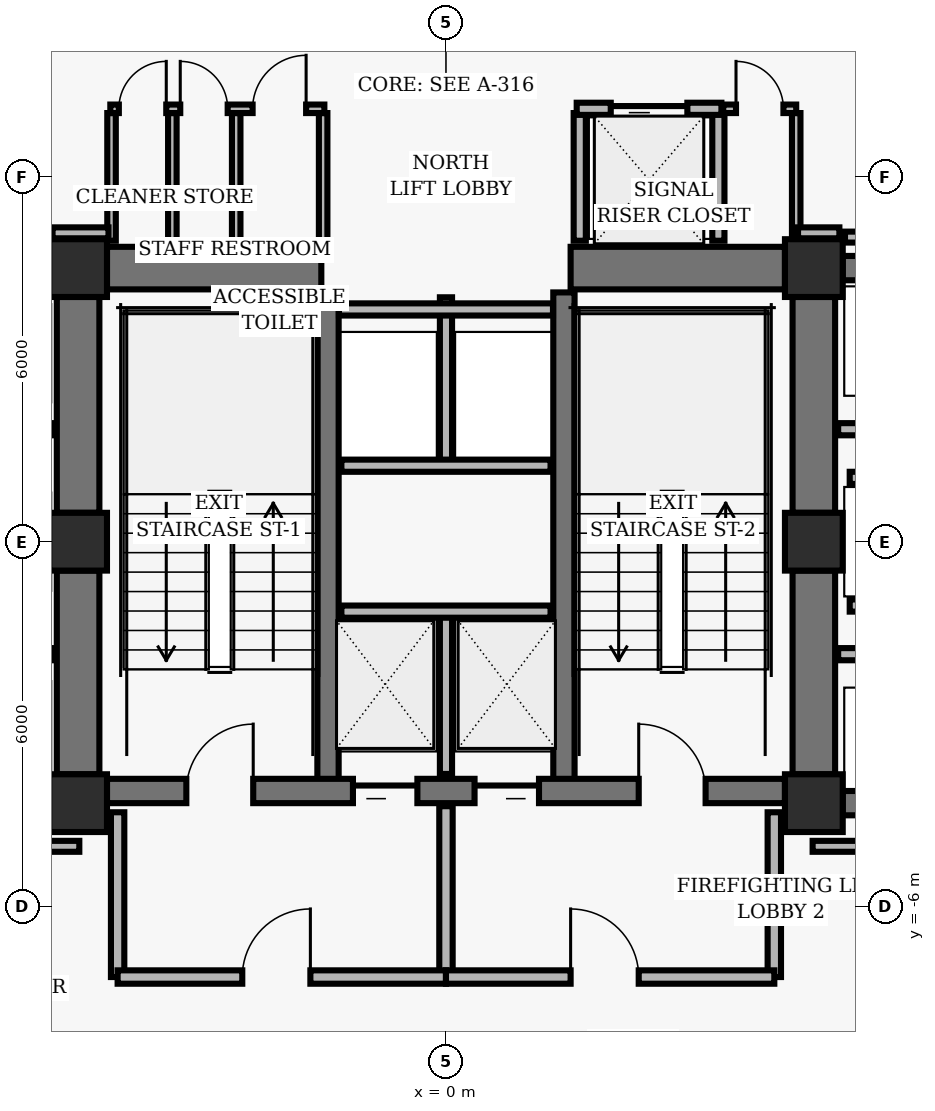
"""IFC4 building model, lengths in metres.
Left out: names, types, materials, properties, quantities, classifications, styles, units other than length and angle.
Written with IfcOpenShell. Run it as: python <this file> out.ifc"""

import sys

from ifc_helpers import new_model, si_unit, direction, frame, frame_2d, origin, origin_2d, place, context, subcontext, project, spatial, rectangle, hollow_rectangle, extrude, element, fill, save


model = new_model("IFC4")
c1 = context("Model", 3, precision=1e-05, world=origin(), true_north=direction((0.0, 1.0)))
c2 = subcontext(c1, "Body", "Model", "MODEL_VIEW")
j1 = project(units=[si_unit("LENGTHUNIT", "METRE"), si_unit("PLANEANGLEUNIT", "RADIAN")], contexts=[c1])
p1 = place(None, origin())
s1 = spatial("IfcSite", under=j1, at=p1, CompositionType="ELEMENT")
p2 = place(p1, origin())
s2 = spatial("IfcBuilding", under=s1, at=p2, CompositionType="ELEMENT")
p3 = place(p2, frame((0.0, 0.0, 49.6)))
s3 = spatial("IfcBuildingStorey", under=s2, at=p3, CompositionType="ELEMENT", Elevation=49.6)
for number, where, z_axis, x_axis in (
    (1, (-6.05, 4.5, 0.0), (0.0, 0.0, 1.0), (1.0, 0.0, 0.0)),
    (2, (6.05, 4.5, 0.0), (0.0, 0.0, 1.0), (1.0, 0.0, 0.0)),
    (3, (-6.05, 0.0, 0.0), (0.0, 0.0, 1.0), (1.0, 0.0, 0.0)),
    (4, (6.05, 0.0, 0.0), (0.0, 0.0, 1.0), (1.0, 0.0, 0.0)),
    (5, (-6.05, -4.3, 0.0), (0.0, 0.0, 1.0), (1.0, 0.0, 0.0)),
    (6, (6.05, -4.3, 0.0), (0.0, 0.0, 1.0), (1.0, 0.0, 0.0)),
):
    element("IfcColumn", number, at=place(p3, frame(where, z_axis=z_axis, x_axis=x_axis)), inside=s3, PredefinedType="COLUMN", context=c2, shape_type="SweptSolid", body=[
        extrude(hollow_rectangle(XDim=0.95, YDim=0.95, WallThickness=0.06, InnerFilletRadius=0.02, OuterFilletRadius=0.04, at=origin_2d()), origin(), (0.0, 0.0, 1.0), 3.36),
    ])
p4 = place(p3, frame((-6.05, 0.475, 0.0), z_axis=(0.0, 0.0, 1.0), x_axis=(0.0, 1.0, 0.0)))
e7 = element("IfcWall", 7, at=p4, inside=s3, PredefinedType="SHEAR", context=c2, shape_type="SweptSolid", body=[
    extrude(rectangle(XDim=3.55, YDim=0.7, at=frame_2d((1.775, 0.0))), origin(), (0.0, 0.0, 1.0), 3.098),
])
p5 = place(p3, frame((-6.05, -3.825, 0.0), z_axis=(0.0, 0.0, 1.0), x_axis=(0.0, 1.0, 0.0)))
e8 = element("IfcWall", 8, at=p5, inside=s3, PredefinedType="SHEAR", context=c2, shape_type="SweptSolid", body=[
    extrude(rectangle(XDim=3.35, YDim=0.7, at=frame_2d((1.675, 0.0))), origin(), (0.0, 0.0, 1.0), 3.098),
])
p6 = place(p3, frame((6.05, 0.475, 0.0), z_axis=(0.0, 0.0, 1.0), x_axis=(0.0, 1.0, 0.0)))
e9 = element("IfcWall", 9, at=p6, inside=s3, PredefinedType="SHEAR", context=c2, shape_type="SweptSolid", body=[
    extrude(rectangle(XDim=3.55, YDim=0.7, at=frame_2d((1.775, 0.0))), origin(), (0.0, 0.0, 1.0), 3.098),
])
p7 = place(p3, frame((6.05, -3.825, 0.0), z_axis=(0.0, 0.0, 1.0), x_axis=(0.0, 1.0, 0.0)))
e10 = element("IfcWall", 10, at=p7, inside=s3, PredefinedType="SHEAR", context=c2, shape_type="SweptSolid", body=[
    extrude(rectangle(XDim=3.35, YDim=0.7, at=frame_2d((1.675, 0.0))), origin(), (0.0, 0.0, 1.0), 3.098),
])
for number, where, z_axis, x_axis in (
    (11, (-1.94, -4.1, 0.0), (0.0, 0.0, 1.0), (0.0, 1.0, 0.0)),
    (12, (1.94, -4.1, 0.0), (0.0, 0.0, 1.0), (0.0, 1.0, 0.0)),
):
    element("IfcWall", number, at=place(p3, frame(where, z_axis=z_axis, x_axis=x_axis)), inside=s3, PredefinedType="SHEAR", context=c2, shape_type="SweptSolid", body=[
        extrude(rectangle(XDim=8.2, YDim=0.35, at=frame_2d((4.1, 0.0))), origin(), (0.0, 0.0, 1.0), 3.098),
    ])
p8 = place(p3, frame((-5.575, -4.1, 0.0), z_axis=(0.0, 0.0, 1.0), x_axis=(1.0, 0.0, 0.0)))
e13 = element("IfcWall", 13, at=p8, inside=s3, PredefinedType="SHEAR", context=c2, shape_type="SweptSolid", body=[
    extrude(rectangle(XDim=11.15, YDim=0.4, at=frame_2d((5.575, 0.0))), origin(), (0.0, 0.0, 1.0), 3.098),
])
p9 = place(p8, frame((1.305, 0.0, 0.0)))
e14 = element("IfcOpeningElement", 14, at=p9, cuts=e13, PredefinedType="OPENING", context=c2, shape_type="SweptSolid", body=[
    extrude(rectangle(XDim=1.1, YDim=2.04, at=frame_2d((0.55, 1.02))), frame((0.0, 0.21, 0.0), z_axis=(0.0, -1.0, 0.0), x_axis=(1.0, 0.0, 0.0)), (0.0, 0.0, 1.0), 0.42),
])
p10 = place(p8, frame((8.745, 0.0, 0.0)))
e15 = element("IfcOpeningElement", 15, at=p10, cuts=e13, PredefinedType="OPENING", context=c2, shape_type="SweptSolid", body=[
    extrude(rectangle(XDim=1.1, YDim=2.04, at=frame_2d((0.55, 1.02))), frame((0.0, 0.21, 0.0), z_axis=(0.0, -1.0, 0.0), x_axis=(1.0, 0.0, 0.0)), (0.0, 0.0, 1.0), 0.42),
])
p11 = place(p8, frame((4.045, 0.0, 0.0)))
e16 = element("IfcOpeningElement", 16, at=p11, cuts=e13, PredefinedType="OPENING", context=c2, shape_type="SweptSolid", body=[
    extrude(rectangle(XDim=1.06, YDim=2.04, at=frame_2d((0.53, 1.02))), frame((0.0, 0.21, 0.0), z_axis=(0.0, -1.0, 0.0), x_axis=(1.0, 0.0, 0.0)), (0.0, 0.0, 1.0), 0.42),
])
p12 = place(p8, frame((6.045, 0.0, 0.0)))
e17 = element("IfcOpeningElement", 17, at=p12, cuts=e13, PredefinedType="OPENING", context=c2, shape_type="SweptSolid", body=[
    extrude(rectangle(XDim=1.06, YDim=2.04, at=frame_2d((0.53, 1.02))), frame((0.0, 0.21, 0.0), z_axis=(0.0, -1.0, 0.0), x_axis=(1.0, 0.0, 0.0)), (0.0, 0.0, 1.0), 0.42),
])
for number, where, z_axis, x_axis in (
    (18, (-5.575, 4.5, 0.0), (0.0, 0.0, 1.0), (1.0, 0.0, 0.0)),
    (19, (2.05, 4.5, 0.0), (0.0, 0.0, 1.0), (1.0, 0.0, 0.0)),
):
    element("IfcWall", number, at=place(p3, frame(where, z_axis=z_axis, x_axis=x_axis)), inside=s3, PredefinedType="SHEAR", context=c2, shape_type="SweptSolid", body=[
        extrude(rectangle(XDim=3.525, YDim=0.7, at=frame_2d((1.762, 0.0))), origin(), (0.0, 0.0, 1.0), 3.098),
    ])
for number, where, z_axis, x_axis in (
    (20, (6.525, 4.5, 0.0), (0.0, 0.0, 1.0), (1.0, 0.0, 0.0)),
    (21, (6.525, -4.3, 0.0), (0.0, 0.0, 1.0), (1.0, 0.0, 0.0)),
):
    element("IfcWall", number, at=place(p3, frame(where, z_axis=z_axis, x_axis=x_axis)), inside=s3, PredefinedType="SHEAR", context=c2, shape_type="SweptSolid", body=[
        extrude(rectangle(XDim=1.95, YDim=0.4, at=frame_2d((0.975, 0.0))), origin(), (0.0, 0.0, 1.0), 3.098),
    ])
p13 = place(p3, frame((0.0, -3.82, 0.0), z_axis=(0.0, 0.0, 1.0), x_axis=(0.0, 1.0, 0.0)))
e22 = element("IfcWall", 22, at=p13, inside=s3, PredefinedType="PARTITIONING", context=c2, shape_type="SweptSolid", body=[
    extrude(rectangle(XDim=2.67, YDim=0.2, at=frame_2d((1.335, 0.0))), origin(), (0.0, 0.0, 1.0), 3.073),
])
p14 = place(p3, frame((-1.72, -1.15, 0.0), z_axis=(0.0, 0.0, 1.0), x_axis=(1.0, 0.0, 0.0)))
e23 = element("IfcWall", 23, at=p14, inside=s3, PredefinedType="PARTITIONING", context=c2, shape_type="SweptSolid", body=[
    extrude(rectangle(XDim=3.44, YDim=0.2, at=frame_2d((1.72, 0.0))), origin(), (0.0, 0.0, 1.0), 3.073),
])
for number, where, z_axis, x_axis in (
    (24, (-5.4, -7.16, 0.0), (0.0, 0.0, 1.0), (0.0, 1.0, 0.0)),
    (25, (5.4, -7.16, 0.0), (0.0, 0.0, 1.0), (0.0, 1.0, 0.0)),
):
    element("IfcWall", number, at=place(p3, frame(where, z_axis=z_axis, x_axis=x_axis)), inside=s3, PredefinedType="PARTITIONING", context=c2, shape_type="SweptSolid", body=[
        extrude(rectangle(XDim=2.71, YDim=0.22, at=frame_2d((1.355, 0.0))), origin(), (0.0, 0.0, 1.0), 3.073),
    ])
p15 = place(p3, frame((0.0, -7.16, 0.0), z_axis=(0.0, 0.0, 1.0), x_axis=(0.0, 1.0, 0.0)))
e26 = element("IfcWall", 26, at=p15, inside=s3, PredefinedType="PARTITIONING", context=c2, shape_type="SweptSolid", body=[
    extrude(rectangle(XDim=2.81, YDim=0.22, at=frame_2d((1.405, 0.0))), origin(), (0.0, 0.0, 1.0), 3.073),
])
p16 = place(p3, frame((-5.4, -7.16, 0.0), z_axis=(0.0, 0.0, 1.0), x_axis=(1.0, 0.0, 0.0)))
e27 = element("IfcWall", 27, at=p16, inside=s3, PredefinedType="PARTITIONING", context=c2, shape_type="SweptSolid", body=[
    extrude(rectangle(XDim=5.4, YDim=0.22, at=frame_2d((2.7, 0.0))), origin(), (0.0, 0.0, 1.0), 2.587),
])
p17 = place(p16, frame((2.05, 0.0, 0.0)))
e28 = element("IfcOpeningElement", 28, at=p17, cuts=e27, PredefinedType="OPENING", context=c2, shape_type="SweptSolid", body=[
    extrude(rectangle(XDim=1.12, YDim=2.02, at=frame_2d((0.56, 1.01))), frame((0.0, 0.12, 0.0), z_axis=(0.0, -1.0, 0.0), x_axis=(1.0, 0.0, 0.0)), (0.0, 0.0, 1.0), 0.24),
])
p18 = place(p3, frame((0.0, -7.16, 0.0), z_axis=(0.0, 0.0, 1.0), x_axis=(1.0, 0.0, 0.0)))
e29 = element("IfcWall", 29, at=p18, inside=s3, PredefinedType="PARTITIONING", context=c2, shape_type="SweptSolid", body=[
    extrude(rectangle(XDim=5.4, YDim=0.22, at=frame_2d((2.7, 0.0))), origin(), (0.0, 0.0, 1.0), 2.587),
])
p19 = place(p18, frame((2.05, 0.0, 0.0)))
e30 = element("IfcOpeningElement", 30, at=p19, cuts=e29, PredefinedType="OPENING", context=c2, shape_type="SweptSolid", body=[
    extrude(rectangle(XDim=1.12, YDim=2.02, at=frame_2d((0.56, 1.01))), frame((0.0, 0.12, 0.0), z_axis=(0.0, -1.0, 0.0), x_axis=(1.0, 0.0, 0.0)), (0.0, 0.0, 1.0), 0.24),
])
p20 = place(p3, frame((0.0, 1.25, 0.0), z_axis=(0.0, 0.0, 1.0), x_axis=(0.0, 1.0, 0.0)))
e31 = element("IfcWall", 31, at=p20, inside=s3, PredefinedType="PARTITIONING", context=c2, shape_type="SweptSolid", body=[
    extrude(rectangle(XDim=2.77, YDim=0.2, at=frame_2d((1.385, 0.0))), origin(), (0.0, 0.0, 1.0), 3.073),
])
p21 = place(p3, frame((-1.72, 1.25, 0.0), z_axis=(0.0, 0.0, 1.0), x_axis=(1.0, 0.0, 0.0)))
e32 = element("IfcWall", 32, at=p21, inside=s3, PredefinedType="PARTITIONING", context=c2, shape_type="SweptSolid", body=[
    extrude(rectangle(XDim=3.44, YDim=0.2, at=frame_2d((1.72, 0.0))), origin(), (0.0, 0.0, 1.0), 3.073),
])
p22 = place(p3, frame((-1.76, 3.82, 0.0), z_axis=(0.0, 0.0, 1.0), x_axis=(1.0, 0.0, 0.0)))
e33 = element("IfcWall", 33, at=p22, inside=s3, PredefinedType="PARTITIONING", context=c2, shape_type="SweptSolid", body=[
    extrude(rectangle(XDim=3.52, YDim=0.2, at=frame_2d((1.76, 0.0))), origin(), (0.0, 0.0, 1.0), 3.073),
])
for number, where, z_axis, x_axis in (
    (34, (2.2, 4.95, 0.0), (0.0, 0.0, 1.0), (0.0, 1.0, 0.0)),
    (35, (4.48, 4.95, 0.0), (0.0, 0.0, 1.0), (0.0, 1.0, 0.0)),
):
    element("IfcWall", number, at=place(p3, frame(where, z_axis=z_axis, x_axis=x_axis)), inside=s3, PredefinedType="PARTITIONING", context=c2, shape_type="SweptSolid", body=[
        extrude(rectangle(XDim=2.1, YDim=0.2, at=frame_2d((1.05, 0.0))), origin(), (0.0, 0.0, 1.0), 3.073),
    ])
p23 = place(p3, frame((2.15, 7.12, 0.0), z_axis=(0.0, 0.0, 1.0), x_axis=(1.0, 0.0, 0.0)))
e36 = element("IfcWall", 36, at=p23, inside=s3, PredefinedType="PARTITIONING", context=c2, shape_type="SweptSolid", body=[
    extrude(rectangle(XDim=2.38, YDim=0.2, at=frame_2d((1.19, 0.0))), origin(), (0.0, 0.0, 1.0), 2.587),
])
p24 = place(p23, frame((0.56, 0.0, 0.0)))
e37 = element("IfcOpeningElement", 37, at=p24, cuts=e36, PredefinedType="OPENING", context=c2, shape_type="SweptSolid", body=[
    extrude(rectangle(XDim=1.26, YDim=2.06, at=frame_2d((0.63, 1.03))), frame((0.0, 0.11, 0.0), z_axis=(0.0, -1.0, 0.0), x_axis=(1.0, 0.0, 0.0)), (0.0, 0.0, 1.0), 0.22),
])
for number, where, z_axis, x_axis in (
    (38, (-5.5, 4.95, 0.0), (0.0, 0.0, 1.0), (0.0, 1.0, 0.0)),
    (39, (-4.5, 4.95, 0.0), (0.0, 0.0, 1.0), (0.0, 1.0, 0.0)),
    (40, (-3.45, 4.95, 0.0), (0.0, 0.0, 1.0), (0.0, 1.0, 0.0)),
    (41, (-2.02, 4.95, 0.0), (0.0, 0.0, 1.0), (0.0, 1.0, 0.0)),
):
    element("IfcWall", number, at=place(p3, frame(where, z_axis=z_axis, x_axis=x_axis)), inside=s3, PredefinedType="PARTITIONING", context=c2, shape_type="SweptSolid", body=[
        extrude(rectangle(XDim=2.1, YDim=0.14, at=frame_2d((1.05, 0.0))), origin(), (0.0, 0.0, 1.0), 3.073),
    ])
p25 = place(p3, frame((-5.52, 7.12, 0.0), z_axis=(0.0, 0.0, 1.0), x_axis=(1.0, 0.0, 0.0)))
e42 = element("IfcWall", 42, at=p25, inside=s3, PredefinedType="PARTITIONING", context=c2, shape_type="SweptSolid", body=[
    extrude(rectangle(XDim=3.52, YDim=0.14, at=frame_2d((1.76, 0.0))), origin(), (0.0, 0.0, 1.0), 3.073),
])
p26 = place(p25, frame((0.14, 0.0, 0.0)))
e43 = element("IfcOpeningElement", 43, at=p26, cuts=e42, PredefinedType="OPENING", context=c2, shape_type="SweptSolid", body=[
    extrude(rectangle(XDim=0.78, YDim=2.01, at=frame_2d((0.39, 1.005))), frame((0.0, 0.08, 0.0), z_axis=(0.0, -1.0, 0.0), x_axis=(1.0, 0.0, 0.0)), (0.0, 0.0, 1.0), 0.16),
])
p27 = place(p25, frame((1.15, 0.0, 0.0)))
e44 = element("IfcOpeningElement", 44, at=p27, cuts=e42, PredefinedType="OPENING", context=c2, shape_type="SweptSolid", body=[
    extrude(rectangle(XDim=0.78, YDim=2.01, at=frame_2d((0.39, 1.005))), frame((0.0, 0.08, 0.0), z_axis=(0.0, -1.0, 0.0), x_axis=(1.0, 0.0, 0.0)), (0.0, 0.0, 1.0), 0.16),
])
p28 = place(p25, frame((2.34, 0.0, 0.0)))
e45 = element("IfcOpeningElement", 45, at=p28, cuts=e42, PredefinedType="OPENING", context=c2, shape_type="SweptSolid", body=[
    extrude(rectangle(XDim=0.88, YDim=2.02, at=frame_2d((0.44, 1.01))), frame((0.0, 0.08, 0.0), z_axis=(0.0, -1.0, 0.0), x_axis=(1.0, 0.0, 0.0)), (0.0, 0.0, 1.0), 0.16),
])
p29 = place(p3, frame((5.76, 4.95, 0.0), z_axis=(0.0, 0.0, 1.0), x_axis=(0.0, 1.0, 0.0)))
e46 = element("IfcWall", 46, at=p29, inside=s3, PredefinedType="PARTITIONING", context=c2, shape_type="SweptSolid", body=[
    extrude(rectangle(XDim=2.1, YDim=0.14, at=frame_2d((1.05, 0.0))), origin(), (0.0, 0.0, 1.0), 3.073),
])
p30 = place(p3, frame((4.56, 7.12, 0.0), z_axis=(0.0, 0.0, 1.0), x_axis=(1.0, 0.0, 0.0)))
e47 = element("IfcWall", 47, at=p30, inside=s3, PredefinedType="PARTITIONING", context=c2, shape_type="SweptSolid", body=[
    extrude(rectangle(XDim=1.2, YDim=0.14, at=frame_2d((0.6, 0.0))), origin(), (0.0, 0.0, 1.0), 2.587),
])
p31 = place(p30, frame((0.21, 0.0, 0.0)))
e48 = element("IfcOpeningElement", 48, at=p31, cuts=e47, PredefinedType="OPENING", context=c2, shape_type="SweptSolid", body=[
    extrude(rectangle(XDim=0.78, YDim=2.01, at=frame_2d((0.39, 1.005))), frame((0.0, 0.08, 0.0), z_axis=(0.0, -1.0, 0.0), x_axis=(1.0, 0.0, 0.0)), (0.0, 0.0, 1.0), 0.16),
])
for number, where, z_axis, x_axis in (
    (49, (-8.55, -1.85, 0.0), (0.0, 0.0, 1.0), (1.0, 0.0, 0.0)),
    (50, (-8.55, 1.85, 0.0), (0.0, 0.0, 1.0), (1.0, 0.0, 0.0)),
    (51, (6.45, -1.85, 0.0), (0.0, 0.0, 1.0), (1.0, 0.0, 0.0)),
    (52, (6.45, 1.85, 0.0), (0.0, 0.0, 1.0), (1.0, 0.0, 0.0)),
):
    element("IfcWall", number, at=place(p3, frame(where, z_axis=z_axis, x_axis=x_axis)), inside=s3, PredefinedType="PARTITIONING", context=c2, shape_type="SweptSolid", body=[
        extrude(rectangle(XDim=2.1, YDim=0.2, at=frame_2d((1.05, 0.0))), origin(), (0.0, 0.0, 1.0), 3.073),
    ])
for number, where, z_axis, x_axis in (
    (53, (6.64, -1.05, 0.0), (0.0, 0.0, 1.0), (1.0, 0.0, 0.0)),
    (54, (6.64, 1.05, 0.0), (0.0, 0.0, 1.0), (1.0, 0.0, 0.0)),
):
    element("IfcWall", number, at=place(p3, frame(where, z_axis=z_axis, x_axis=x_axis)), inside=s3, PredefinedType="PARTITIONING", context=c2, shape_type="SweptSolid", body=[
        extrude(rectangle(XDim=1.91, YDim=0.2, at=frame_2d((0.955, 0.0))), origin(), (0.0, 0.0, 1.0), 3.073),
    ])
for number, where, z_axis, x_axis in (
    (55, (-9.37, -5.01, 0.0), (0.0, 0.0, 1.0), (1.0, 0.0, 0.0)),
    (56, (6.03, -5.01, 0.0), (0.0, 0.0, 1.0), (1.0, 0.0, 0.0)),
):
    element("IfcWall", number, at=place(p3, frame(where, z_axis=z_axis, x_axis=x_axis)), inside=s3, PredefinedType="PARTITIONING", context=c2, shape_type="SweptSolid", body=[
        extrude(rectangle(XDim=3.34, YDim=0.18, at=frame_2d((1.67, 0.0))), origin(), (0.0, 0.0, 1.0), 3.073),
    ])
p32 = place(p3, frame((9.37, 5.01, 0.0), z_axis=(0.0, 0.0, 1.0), x_axis=(-1.0, 0.0, 0.0)))
e57 = element("IfcWall", 57, at=p32, inside=s3, PredefinedType="PARTITIONING", context=c2, shape_type="SweptSolid", body=[
    extrude(rectangle(XDim=2.808, YDim=0.18, at=frame_2d((1.404, 0.0))), origin(), (0.0, 0.0, 1.0), 3.073),
])
p33 = place(p3, frame((6.47, 5.08, 0.0), z_axis=(0.0, 0.0, 1.0), x_axis=(-1.0, 0.0, 0.0)))
e58 = element("IfcWall", 58, at=p33, inside=s3, PredefinedType="PARTITIONING", context=c2, shape_type="SweptSolid", body=[
    extrude(rectangle(XDim=0.68, YDim=0.18, at=frame_2d((0.34, 0.0))), origin(), (0.0, 0.0, 1.0), 3.073),
])
p34 = place(p3, frame((-5.55, 5.08, 0.0), z_axis=(0.0, 0.0, 1.0), x_axis=(-1.0, 0.0, 0.0)))
e59 = element("IfcWall", 59, at=p34, inside=s3, PredefinedType="PARTITIONING", context=c2, shape_type="SweptSolid", body=[
    extrude(rectangle(XDim=0.92, YDim=0.18, at=frame_2d((0.46, 0.0))), origin(), (0.0, 0.0, 1.0), 3.073),
])
p35 = place(p9, origin())
e60 = element("IfcDoor", 60, at=p35, inside=s3, OperationType="SINGLE_SWING_RIGHT", PredefinedType="DOOR", context=c2, shape_type="SweptSolid", body=[
    extrude(rectangle(XDim=1.1, YDim=2.04, at=frame_2d((0.55, 1.02))), frame((0.0, 0.025, 0.0), z_axis=(0.0, -1.0, 0.0), x_axis=(1.0, 0.0, 0.0)), (0.0, 0.0, 1.0), 0.05),
])
fill(e14, e60)
p36 = place(p10, origin())
e61 = element("IfcDoor", 61, at=p36, inside=s3, OperationType="SINGLE_SWING_LEFT", PredefinedType="DOOR", context=c2, shape_type="SweptSolid", body=[
    extrude(rectangle(XDim=1.1, YDim=2.04, at=frame_2d((0.55, 1.02))), frame((0.0, 0.025, 0.0), z_axis=(0.0, -1.0, 0.0), x_axis=(1.0, 0.0, 0.0)), (0.0, 0.0, 1.0), 0.05),
])
fill(e15, e61)
p37 = place(p11, origin())
e62 = element("IfcDoor", 62, at=p37, inside=s3, OperationType="SLIDING_TO_LEFT", PredefinedType="DOOR", context=c2, shape_type="SweptSolid", body=[
    extrude(rectangle(XDim=1.06, YDim=2.04, at=frame_2d((0.53, 1.02))), frame((0.0, 0.025, 0.0), z_axis=(0.0, -1.0, 0.0), x_axis=(1.0, 0.0, 0.0)), (0.0, 0.0, 1.0), 0.05),
])
fill(e16, e62)
p38 = place(p12, origin())
e63 = element("IfcDoor", 63, at=p38, inside=s3, OperationType="SLIDING_TO_RIGHT", PredefinedType="DOOR", context=c2, shape_type="SweptSolid", body=[
    extrude(rectangle(XDim=1.06, YDim=2.04, at=frame_2d((0.53, 1.02))), frame((0.0, 0.025, 0.0), z_axis=(0.0, -1.0, 0.0), x_axis=(1.0, 0.0, 0.0)), (0.0, 0.0, 1.0), 0.05),
])
fill(e17, e63)
p39 = place(p17, origin())
e64 = element("IfcDoor", 64, at=p39, inside=s3, OperationType="SINGLE_SWING_RIGHT", PredefinedType="DOOR", context=c2, shape_type="SweptSolid", body=[
    extrude(rectangle(XDim=1.12, YDim=2.02, at=frame_2d((0.56, 1.01))), frame((0.0, 0.025, 0.0), z_axis=(0.0, -1.0, 0.0), x_axis=(1.0, 0.0, 0.0)), (0.0, 0.0, 1.0), 0.05),
])
fill(e28, e64)
p40 = place(p19, origin())
e65 = element("IfcDoor", 65, at=p40, inside=s3, OperationType="SINGLE_SWING_LEFT", PredefinedType="DOOR", context=c2, shape_type="SweptSolid", body=[
    extrude(rectangle(XDim=1.12, YDim=2.02, at=frame_2d((0.56, 1.01))), frame((0.0, 0.025, 0.0), z_axis=(0.0, -1.0, 0.0), x_axis=(1.0, 0.0, 0.0)), (0.0, 0.0, 1.0), 0.05),
])
fill(e30, e65)
p41 = place(p24, origin())
e66 = element("IfcDoor", 66, at=p41, inside=s3, OperationType="SLIDING_TO_LEFT", PredefinedType="DOOR", context=c2, shape_type="SweptSolid", body=[
    extrude(rectangle(XDim=1.26, YDim=2.06, at=frame_2d((0.63, 1.03))), frame((0.0, 0.025, 0.0), z_axis=(0.0, -1.0, 0.0), x_axis=(1.0, 0.0, 0.0)), (0.0, 0.0, 1.0), 0.05),
])
fill(e37, e66)
p42 = place(p26, origin())
e67 = element("IfcDoor", 67, at=p42, inside=s3, OperationType="SINGLE_SWING_RIGHT", PredefinedType="DOOR", context=c2, shape_type="SweptSolid", body=[
    extrude(rectangle(XDim=0.78, YDim=2.01, at=frame_2d((0.39, 1.005))), frame((0.0, 0.025, 0.0), z_axis=(0.0, -1.0, 0.0), x_axis=(1.0, 0.0, 0.0)), (0.0, 0.0, 1.0), 0.05),
])
fill(e43, e67)
p43 = place(p27, origin())
e68 = element("IfcDoor", 68, at=p43, inside=s3, OperationType="SINGLE_SWING_LEFT", PredefinedType="DOOR", context=c2, shape_type="SweptSolid", body=[
    extrude(rectangle(XDim=0.78, YDim=2.01, at=frame_2d((0.39, 1.005))), frame((0.0, 0.025, 0.0), z_axis=(0.0, -1.0, 0.0), x_axis=(1.0, 0.0, 0.0)), (0.0, 0.0, 1.0), 0.05),
])
fill(e44, e68)
p44 = place(p28, origin())
e69 = element("IfcDoor", 69, at=p44, inside=s3, OperationType="SINGLE_SWING_RIGHT", PredefinedType="DOOR", context=c2, shape_type="SweptSolid", body=[
    extrude(rectangle(XDim=0.88, YDim=2.02, at=frame_2d((0.44, 1.01))), frame((0.0, 0.025, 0.0), z_axis=(0.0, -1.0, 0.0), x_axis=(1.0, 0.0, 0.0)), (0.0, 0.0, 1.0), 0.05),
])
fill(e45, e69)
p45 = place(p31, origin())
e70 = element("IfcDoor", 70, at=p45, inside=s3, OperationType="SINGLE_SWING_LEFT", PredefinedType="DOOR", context=c2, shape_type="SweptSolid", body=[
    extrude(rectangle(XDim=0.78, YDim=2.01, at=frame_2d((0.39, 1.005))), frame((0.0, 0.025, 0.0), z_axis=(0.0, -1.0, 0.0), x_axis=(1.0, 0.0, 0.0)), (0.0, 0.0, 1.0), 0.05),
])
fill(e48, e70)
save(model, sys.argv[1])
